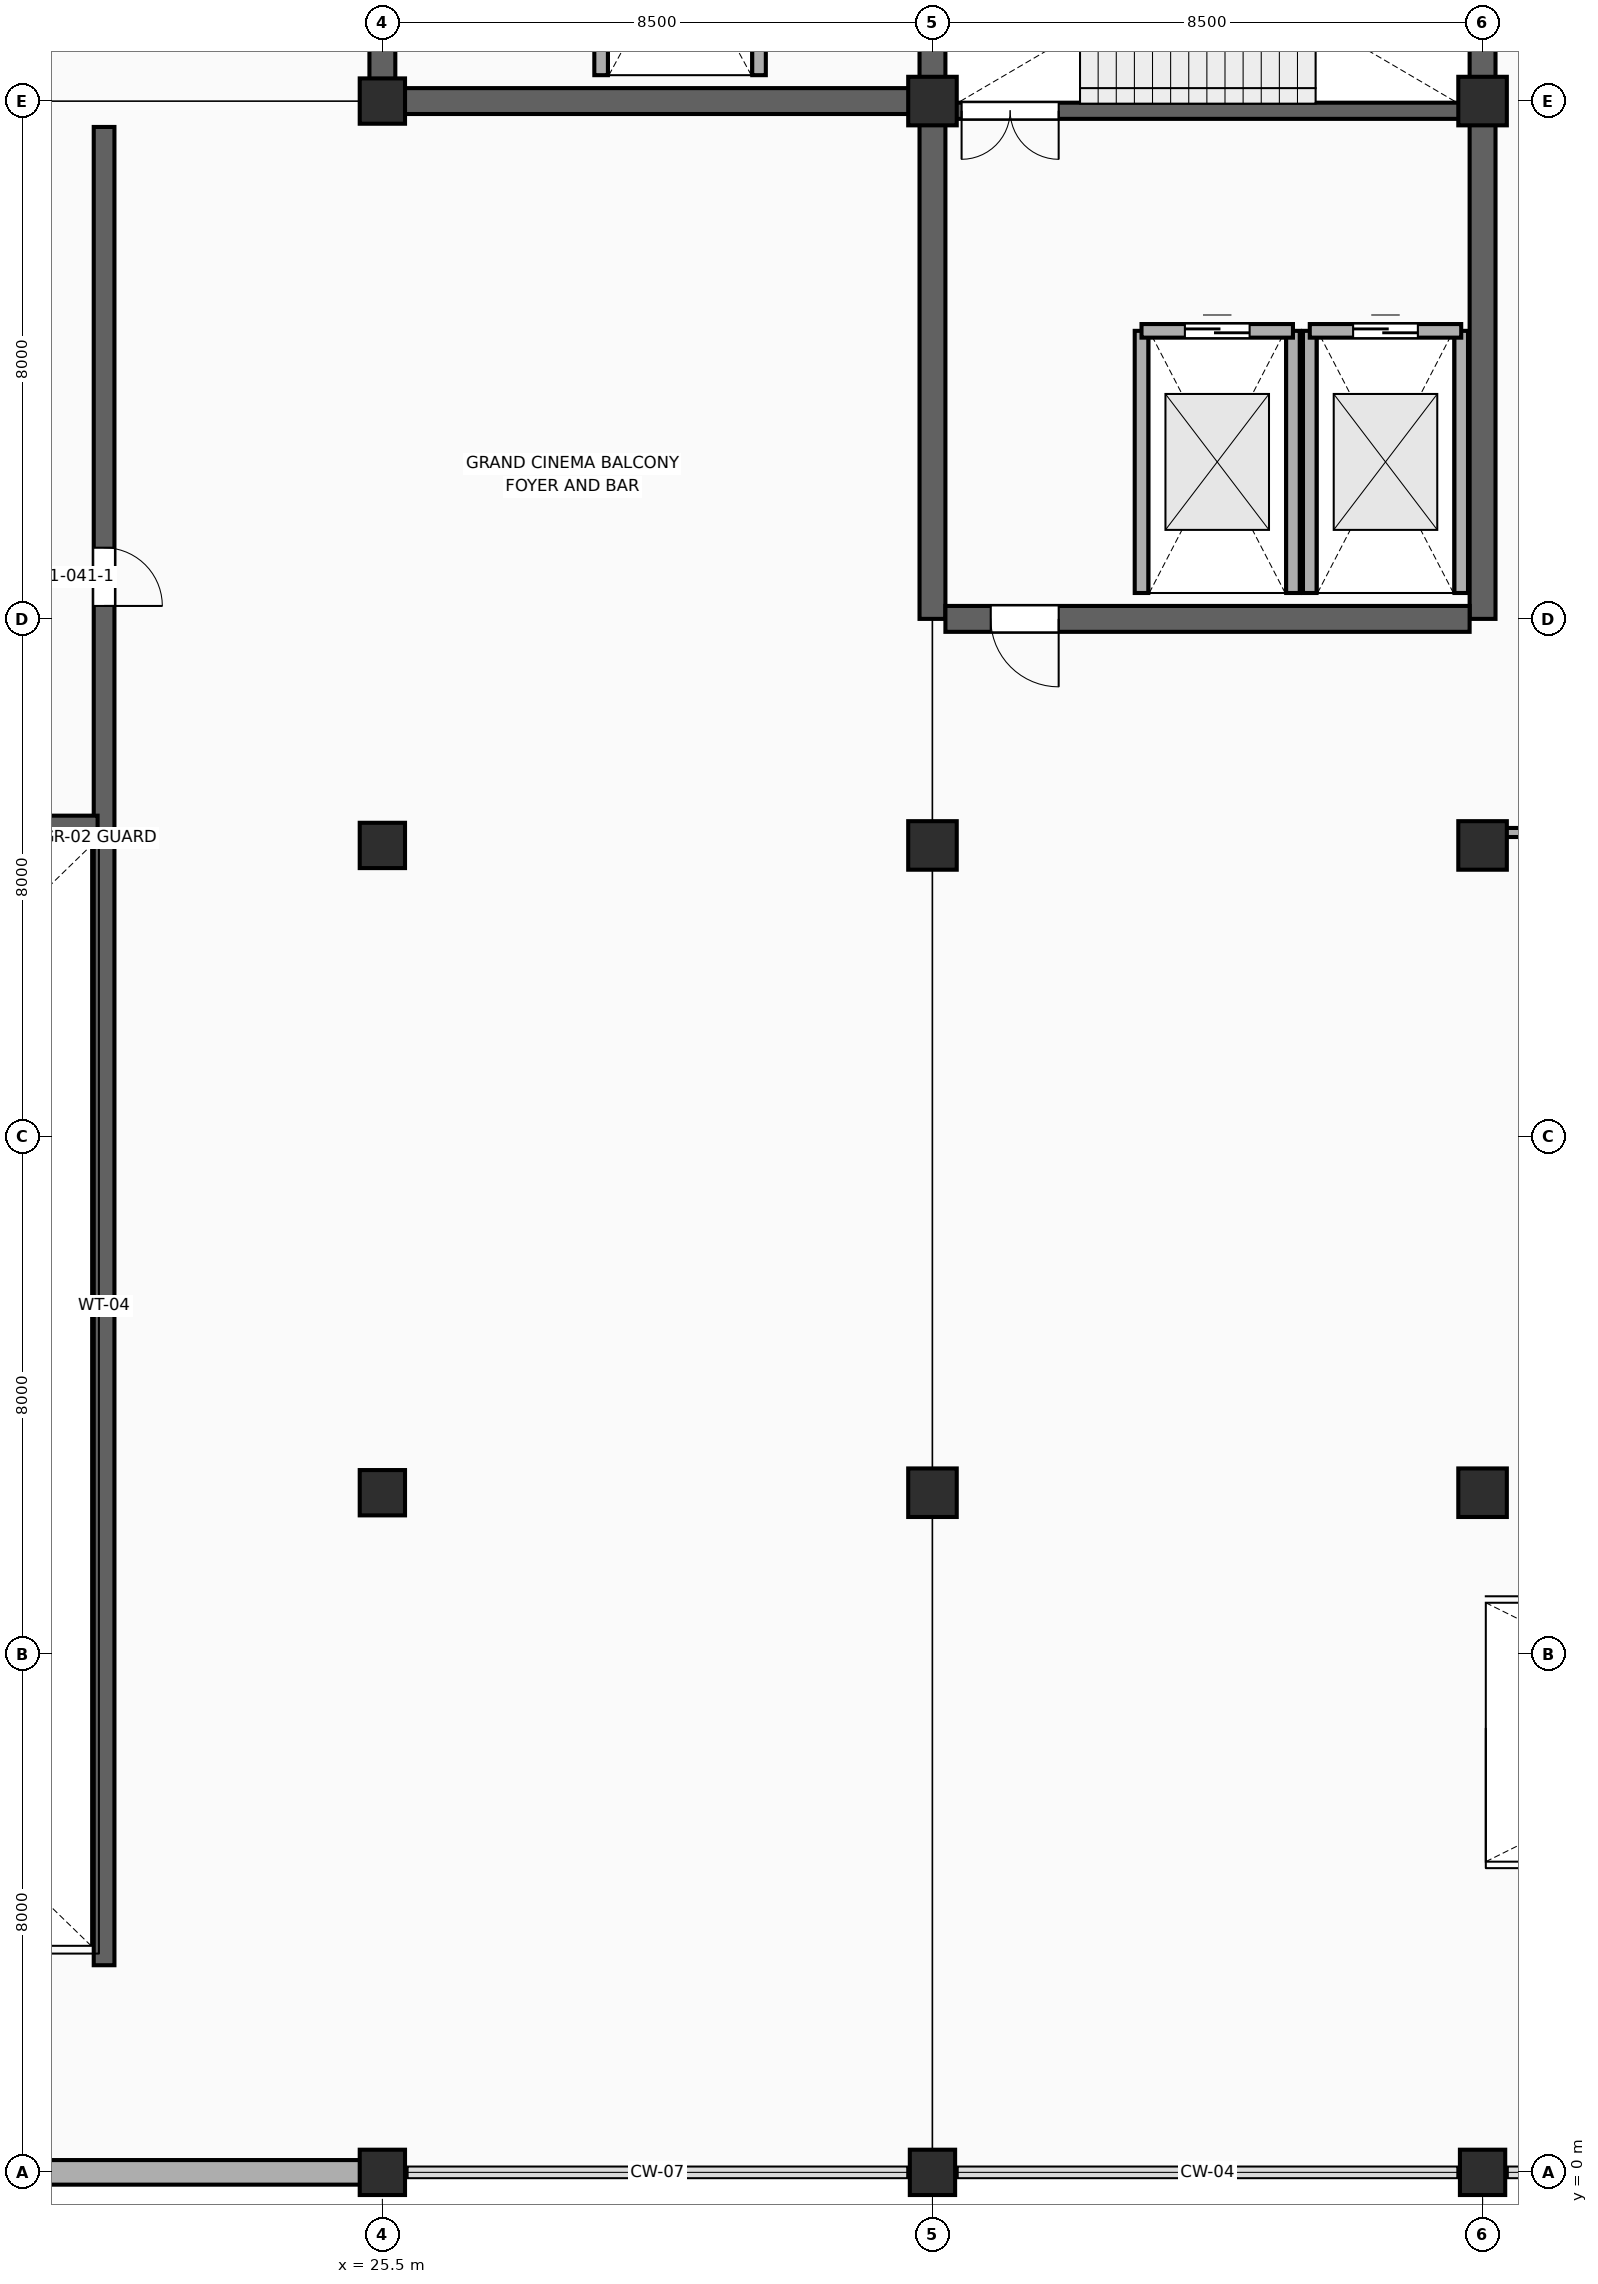
"""IFC4 building model, lengths in metres.
Left out: names, types, materials, properties, quantities, classifications, styles, units other than length and angle.
Written with IfcOpenShell. Run it as: python <this file> out.ifc"""

import sys

from ifc_helpers import new_model, si_unit, direction, frame, frame_2d, origin, origin_with_axes, origin_2d, place, context, subcontext, project, spatial, rectangle, extrude, element, fill, save


model = new_model("IFC4")
c1 = context("Model", 3, precision=1e-05, world=origin(), true_north=direction((0.0, 1.0)))
c2 = subcontext(c1, "Body", "Model", "MODEL_VIEW")
j1 = project(units=[si_unit("LENGTHUNIT", "METRE"), si_unit("PLANEANGLEUNIT", "RADIAN")], contexts=[c1])
p1 = place(None, origin())
s1 = spatial("IfcSite", under=j1, at=p1, CompositionType="ELEMENT")
p2 = place(p1, origin())
s2 = spatial("IfcBuilding", under=s1, at=p2, CompositionType="ELEMENT")
p3 = place(p2, frame((0.0, 0.0, 5.4)))
s3 = spatial("IfcBuildingStorey", under=s2, at=p3, CompositionType="ELEMENT", Elevation=5.4)
p4 = place(p3, frame((25.5, 32.0, 0.0), z_axis=(0.0, 0.0, 1.0), x_axis=(0.0, 1.0, 0.0)))
e1 = element("IfcWall", 1, at=p4, inside=s3, PredefinedType="SHEAR", context=c2, shape_type="SweptSolid", body=[
    extrude(rectangle(XDim=12.8, YDim=0.4, at=frame_2d((6.4, 0.0))), origin(), (0.0, 0.0, 1.0), 4.64),
])
p5 = place(p4, frame((1.25, 0.0, 0.0)))
e2 = element("IfcOpeningElement", 2, at=p5, cuts=e1, PredefinedType="OPENING", context=c2, shape_type="SweptSolid", body=[
    extrude(rectangle(XDim=1.05, YDim=2.15, at=frame_2d((0.525, 1.075))), frame((0.0, 0.212, 0.0), z_axis=(0.0, -1.0, 0.0), x_axis=(1.0, 0.0, 0.0)), (0.0, 0.0, 1.0), 0.424),
])
p6 = place(p3, frame((34.0, 32.0, 0.0), z_axis=(0.0, 0.0, 1.0), x_axis=(0.0, 1.0, 0.0)))
e3 = element("IfcWall", 3, at=p6, inside=s3, PredefinedType="SHEAR", context=c2, shape_type="SweptSolid", body=[
    extrude(rectangle(XDim=12.8, YDim=0.4, at=frame_2d((6.4, 0.0))), origin(), (0.0, 0.0, 1.0), 4.64),
])
p7 = place(p3, frame((25.7, 32.0, 0.0), z_axis=(0.0, 0.0, 1.0), x_axis=(1.0, 0.0, 0.0)))
e4 = element("IfcWall", 4, at=p7, inside=s3, PredefinedType="SHEAR", context=c2, shape_type="SweptSolid", body=[
    extrude(rectangle(XDim=8.1, YDim=0.4, at=frame_2d((4.05, 0.0))), origin(), (0.0, 0.0, 1.0), 4.64),
])
for number, where, z_axis, x_axis in (
    (5, (28.88, 32.4, 0.0), (0.0, 0.0, 1.0), (0.0, 1.0, 0.0)),
    (6, (31.32, 32.4, 0.0), (0.0, 0.0, 1.0), (0.0, 1.0, 0.0)),
):
    element("IfcWall", number, at=place(p3, frame(where, z_axis=z_axis, x_axis=x_axis)), inside=s3, PredefinedType="PARTITIONING", context=c2, shape_type="SweptSolid", body=[
        extrude(rectangle(XDim=4.05, YDim=0.21, at=frame_2d((2.025, 0.0))), origin(), (0.0, 0.0, 1.0), 4.64),
    ])
p8 = place(p3, frame((34.0, 24.0, 0.0), z_axis=(0.0, 0.0, 1.0), x_axis=(0.0, 1.0, 0.0)))
e7 = element("IfcWall", 7, at=p8, inside=s3, PredefinedType="SHEAR", context=c2, shape_type="SweptSolid", body=[
    extrude(rectangle(XDim=7.8, YDim=0.4, at=frame_2d((3.9, 0.0))), origin(), (0.0, 0.0, 1.0), 4.64),
])
p9 = place(p3, frame((42.5, 24.0, 0.0), z_axis=(0.0, 0.0, 1.0), x_axis=(0.0, 1.0, 0.0)))
e8 = element("IfcWall", 8, at=p9, inside=s3, PredefinedType="SHEAR", context=c2, shape_type="SweptSolid", body=[
    extrude(rectangle(XDim=12.8, YDim=0.4, at=frame_2d((6.4, 0.0))), origin(), (0.0, 0.0, 1.0), 4.64),
])
p10 = place(p3, frame((34.2, 24.0, 0.0), z_axis=(0.0, 0.0, 1.0), x_axis=(1.0, 0.0, 0.0)))
e9 = element("IfcWall", 9, at=p10, inside=s3, PredefinedType="SHEAR", context=c2, shape_type="SweptSolid", body=[
    extrude(rectangle(XDim=8.1, YDim=0.4, at=frame_2d((4.05, 0.0))), origin(), (0.0, 0.0, 1.0), 4.64),
])
p11 = place(p10, frame((0.7, 0.0, 0.0)))
e10 = element("IfcOpeningElement", 10, at=p11, cuts=e9, PredefinedType="OPENING", context=c2, shape_type="SweptSolid", body=[
    extrude(rectangle(XDim=1.05, YDim=2.15, at=frame_2d((0.525, 1.075))), frame((0.0, 0.212, 0.0), z_axis=(0.0, -1.0, 0.0), x_axis=(1.0, 0.0, 0.0)), (0.0, 0.0, 1.0), 0.424),
])
p12 = place(p3, frame((34.25, 31.85, 0.0), z_axis=(0.0, 0.0, 1.0), x_axis=(1.0, 0.0, 0.0)))
e11 = element("IfcWall", 11, at=p12, inside=s3, PredefinedType="STANDARD", context=c2, shape_type="SweptSolid", body=[
    extrude(rectangle(XDim=8.0, YDim=0.25, at=frame_2d((4.0, 0.0))), origin(), (0.0, 0.0, 1.0), 4.64),
])
p13 = place(p12, frame((0.2, 0.0, 0.0)))
e12 = element("IfcOpeningElement", 12, at=p13, cuts=e11, PredefinedType="OPENING", context=c2, shape_type="SweptSolid", body=[
    extrude(rectangle(XDim=1.5, YDim=2.2, at=frame_2d((0.75, 1.1))), frame((0.0, 0.137, 0.0), z_axis=(0.0, -1.0, 0.0), x_axis=(1.0, 0.0, 0.0)), (0.0, 0.0, 1.0), 0.274),
])
for number, where, z_axis, x_axis in (
    (13, (37.23, 24.4, 0.0), (0.0, 0.0, 1.0), (0.0, 1.0, 0.0)),
    (14, (39.57, 24.4, 0.0), (0.0, 0.0, 1.0), (0.0, 1.0, 0.0)),
):
    element("IfcWall", number, at=place(p3, frame(where, z_axis=z_axis, x_axis=x_axis)), inside=s3, PredefinedType="PARTITIONING", context=c2, shape_type="SweptSolid", body=[
        extrude(rectangle(XDim=4.05, YDim=0.21, at=frame_2d((2.025, 0.0))), origin(), (0.0, 0.0, 1.0), 4.64),
    ])
p14 = place(p3, frame((37.23, 28.45, 0.0), z_axis=(0.0, 0.0, 1.0), x_axis=(1.0, 0.0, 0.0)))
e15 = element("IfcWall", 15, at=p14, inside=s3, PredefinedType="PARTITIONING", context=c2, shape_type="SweptSolid", body=[
    extrude(rectangle(XDim=2.34, YDim=0.21, at=frame_2d((1.17, 0.0))), origin(), (0.0, 0.0, 1.0), 4.64),
])
p15 = place(p14, frame((0.67, 0.0, 0.0)))
e16 = element("IfcOpeningElement", 16, at=p15, cuts=e15, PredefinedType="OPENING", context=c2, shape_type="SweptSolid", body=[
    extrude(rectangle(XDim=1.0, YDim=2.2, at=frame_2d((0.5, 1.1))), frame((0.0, 0.117, 0.0), z_axis=(0.0, -1.0, 0.0), x_axis=(1.0, 0.0, 0.0)), (0.0, 0.0, 1.0), 0.234),
])
for number, where, z_axis, x_axis in (
    (17, (39.83, 24.4, 0.0), (0.0, 0.0, 1.0), (0.0, 1.0, 0.0)),
    (18, (42.17, 24.4, 0.0), (0.0, 0.0, 1.0), (0.0, 1.0, 0.0)),
):
    element("IfcWall", number, at=place(p3, frame(where, z_axis=z_axis, x_axis=x_axis)), inside=s3, PredefinedType="PARTITIONING", context=c2, shape_type="SweptSolid", body=[
        extrude(rectangle(XDim=4.05, YDim=0.21, at=frame_2d((2.025, 0.0))), origin(), (0.0, 0.0, 1.0), 4.64),
    ])
p16 = place(p3, frame((39.83, 28.45, 0.0), z_axis=(0.0, 0.0, 1.0), x_axis=(1.0, 0.0, 0.0)))
e19 = element("IfcWall", 19, at=p16, inside=s3, PredefinedType="PARTITIONING", context=c2, shape_type="SweptSolid", body=[
    extrude(rectangle(XDim=2.34, YDim=0.21, at=frame_2d((1.17, 0.0))), origin(), (0.0, 0.0, 1.0), 4.64),
])
p17 = place(p16, frame((0.67, 0.0, 0.0)))
e20 = element("IfcOpeningElement", 20, at=p17, cuts=e19, PredefinedType="OPENING", context=c2, shape_type="SweptSolid", body=[
    extrude(rectangle(XDim=1.0, YDim=2.2, at=frame_2d((0.5, 1.1))), frame((0.0, 0.117, 0.0), z_axis=(0.0, -1.0, 0.0), x_axis=(1.0, 0.0, 0.0)), (0.0, 0.0, 1.0), 0.234),
])
for number, where, z_axis, x_axis in (
    (21, (25.5, 0.0, 0.0), (0.0, 0.0, 1.0), (1.0, 0.0, 0.0)),
    (22, (25.5, 10.5, 0.0), (0.0, 0.0, 1.0), (1.0, 0.0, 0.0)),
    (23, (25.5, 20.5, 0.0), (0.0, 0.0, 1.0), (1.0, 0.0, 0.0)),
    (24, (25.5, 32.0, 0.0), (0.0, 0.0, 1.0), (1.0, 0.0, 0.0)),
):
    element("IfcColumn", number, at=place(p3, frame(where, z_axis=z_axis, x_axis=x_axis)), inside=s3, PredefinedType="COLUMN", context=c2, shape_type="SweptSolid", body=[
        extrude(rectangle(XDim=0.7, YDim=0.7, at=origin_2d()), origin(), (0.0, 0.0, 1.0), 4.54),
    ])
p18 = place(p3, frame((34.0, 0.0, 0.0), z_axis=(0.0, 0.0, 1.0), x_axis=(1.0, 0.0, 0.0)))
e25 = element("IfcColumn", 25, at=p18, inside=s3, PredefinedType="COLUMN", context=c2, shape_type="SweptSolid", body=[
    extrude(rectangle(XDim=0.7, YDim=0.7, at=origin_2d()), origin(), (0.0, 0.0, 1.0), 4.52),
])
for number, where, z_axis, x_axis in (
    (26, (34.0, 10.5, 0.0), (0.0, 0.0, 1.0), (1.0, 0.0, 0.0)),
    (27, (34.0, 20.5, 0.0), (0.0, 0.0, 1.0), (1.0, 0.0, 0.0)),
    (28, (34.0, 32.0, 0.0), (0.0, 0.0, 1.0), (1.0, 0.0, 0.0)),
):
    element("IfcColumn", number, at=place(p3, frame(where, z_axis=z_axis, x_axis=x_axis)), inside=s3, PredefinedType="COLUMN", context=c2, shape_type="SweptSolid", body=[
        extrude(rectangle(XDim=0.75, YDim=0.75, at=origin_2d()), origin(), (0.0, 0.0, 1.0), 4.52),
    ])
p19 = place(p3, frame((42.5, 0.0, 0.0), z_axis=(0.0, 0.0, 1.0), x_axis=(1.0, 0.0, 0.0)))
e29 = element("IfcColumn", 29, at=p19, inside=s3, PredefinedType="COLUMN", context=c2, shape_type="SweptSolid", body=[
    extrude(rectangle(XDim=0.7, YDim=0.7, at=origin_2d()), origin(), (0.0, 0.0, 1.0), 4.52),
])
for number, where, z_axis, x_axis in (
    (30, (42.5, 10.5, 0.0), (0.0, 0.0, 1.0), (1.0, 0.0, 0.0)),
    (31, (42.5, 20.5, 0.0), (0.0, 0.0, 1.0), (1.0, 0.0, 0.0)),
    (32, (42.5, 32.0, 0.0), (0.0, 0.0, 1.0), (1.0, 0.0, 0.0)),
):
    element("IfcColumn", number, at=place(p3, frame(where, z_axis=z_axis, x_axis=x_axis)), inside=s3, PredefinedType="COLUMN", context=c2, shape_type="SweptSolid", body=[
        extrude(rectangle(XDim=0.75, YDim=0.75, at=origin_2d()), origin(), (0.0, 0.0, 1.0), 4.52),
    ])
p20 = place(p3, origin_with_axes())
e33 = element("IfcWall", 33, at=p20, inside=s3, PredefinedType="STANDARD", context=c2, shape_type="SweptSolid", body=[
    extrude(rectangle(XDim=25.5, YDim=0.38, at=frame_2d((12.75, 0.0))), origin(), (0.0, 0.0, 1.0), 4.128),
])
p21 = place(p20, frame((2.95, 0.0, 2.568)))
e34 = element("IfcOpeningElement", 34, at=p21, cuts=e33, PredefinedType="OPENING", context=c2, shape_type="SweptSolid", body=[
    extrude(rectangle(XDim=2.6, YDim=1.4, at=frame_2d((1.3, 0.7))), frame((0.0, 0.202, 0.0), z_axis=(0.0, -1.0, 0.0), x_axis=(1.0, 0.0, 0.0)), (0.0, 0.0, 1.0), 0.404),
])
p22 = place(p20, frame((11.45, 0.0, 2.568)))
e35 = element("IfcOpeningElement", 35, at=p22, cuts=e33, PredefinedType="OPENING", context=c2, shape_type="SweptSolid", body=[
    extrude(rectangle(XDim=2.6, YDim=1.4, at=frame_2d((1.3, 0.7))), frame((0.0, 0.202, 0.0), z_axis=(0.0, -1.0, 0.0), x_axis=(1.0, 0.0, 0.0)), (0.0, 0.0, 1.0), 0.404),
])
p23 = place(p3, frame((21.2, 3.2, 0.0), z_axis=(0.0, 0.0, 1.0), x_axis=(0.0, 1.0, 0.0)))
e36 = element("IfcWall", 36, at=p23, inside=s3, PredefinedType="SHEAR", context=c2, shape_type="SweptSolid", body=[
    extrude(rectangle(XDim=28.4, YDim=0.32, at=frame_2d((14.2, 0.0))), origin(), (0.0, 0.0, 1.0), 4.5),
])
p24 = place(p23, frame((21.0, 0.0, 0.0)))
e37 = element("IfcOpeningElement", 37, at=p24, cuts=e36, PredefinedType="OPENING", context=c2, shape_type="SweptSolid", body=[
    extrude(rectangle(XDim=0.9, YDim=2.1, at=frame_2d((0.45, 1.05))), frame((0.0, 0.172, 0.0), z_axis=(0.0, -1.0, 0.0), x_axis=(1.0, 0.0, 0.0)), (0.0, 0.0, 1.0), 0.344),
])
p25 = place(p3, frame((3.2, 20.8, 0.0), z_axis=(0.0, 0.0, 1.0), x_axis=(1.0, 0.0, 0.0)))
e38 = element("IfcWall", 38, at=p25, inside=s3, PredefinedType="SHEAR", context=c2, shape_type="SweptSolid", body=[
    extrude(rectangle(XDim=17.9, YDim=0.32, at=frame_2d((8.95, 0.0))), origin(), (0.0, 0.0, 1.0), 4.5),
])
p26 = place(p3, frame((42.8, 20.7, 0.0), z_axis=(0.0, 0.0, 1.0), x_axis=(1.0, 0.0, 0.0)))
e39 = element("IfcWall", 39, at=p26, inside=s3, PredefinedType="PARTITIONING", context=c2, shape_type="SweptSolid", body=[
    extrude(rectangle(XDim=24.9, YDim=0.14, at=frame_2d((12.45, 0.0))), origin(), (0.0, 0.0, 1.0), 3.66),
])
p27 = place(p26, frame((21.0, 0.0, 0.0)))
e40 = element("IfcOpeningElement", 40, at=p27, cuts=e39, PredefinedType="OPENING", context=c2, shape_type="SweptSolid", body=[
    extrude(rectangle(XDim=1.7, YDim=2.35, at=frame_2d((0.85, 1.175))), frame((0.0, 0.082, 0.0), z_axis=(0.0, -1.0, 0.0), x_axis=(1.0, 0.0, 0.0)), (0.0, 0.0, 1.0), 0.164),
])
p28 = place(p26, frame((4.0, 0.0, 1.0)))
e41 = element("IfcOpeningElement", 41, at=p28, cuts=e39, PredefinedType="OPENING", context=c2, shape_type="SweptSolid", body=[
    extrude(rectangle(XDim=2.8, YDim=1.6, at=frame_2d((1.4, 0.8))), frame((0.0, 0.082, 0.0), z_axis=(0.0, -1.0, 0.0), x_axis=(1.0, 0.0, 0.0)), (0.0, 0.0, 1.0), 0.164),
])
p29 = place(p13, frame((1.5, 0.0, 0.0), z_axis=(0.0, 0.0, 1.0), x_axis=(-1.0, 0.0, 0.0)))
e42 = element("IfcDoor", 42, at=p29, inside=s3, OperationType="DOUBLE_DOOR_SINGLE_SWING", PredefinedType="DOOR", context=c2, shape_type="SweptSolid", body=[
    extrude(rectangle(XDim=1.5, YDim=2.2, at=frame_2d((0.75, 1.1))), frame((0.0, 0.025, 0.0), z_axis=(0.0, -1.0, 0.0), x_axis=(1.0, 0.0, 0.0)), (0.0, 0.0, 1.0), 0.05),
])
fill(e12, e42)
p30 = place(p15, origin())
e43 = element("IfcDoor", 43, at=p30, inside=s3, OperationType="DOUBLE_DOOR_SLIDING", PredefinedType="DOOR", context=c2, shape_type="SweptSolid", body=[
    extrude(rectangle(XDim=1.0, YDim=2.2, at=frame_2d((0.5, 1.1))), frame((0.0, 0.025, 0.0), z_axis=(0.0, -1.0, 0.0), x_axis=(1.0, 0.0, 0.0)), (0.0, 0.0, 1.0), 0.05),
])
fill(e16, e43)
p31 = place(p17, origin())
e44 = element("IfcDoor", 44, at=p31, inside=s3, OperationType="DOUBLE_DOOR_SLIDING", PredefinedType="DOOR", context=c2, shape_type="SweptSolid", body=[
    extrude(rectangle(XDim=1.0, YDim=2.2, at=frame_2d((0.5, 1.1))), frame((0.0, 0.025, 0.0), z_axis=(0.0, -1.0, 0.0), x_axis=(1.0, 0.0, 0.0)), (0.0, 0.0, 1.0), 0.05),
])
fill(e20, e44)
p32 = place(p11, frame((1.05, 0.0, 0.0), z_axis=(0.0, 0.0, 1.0), x_axis=(-1.0, 0.0, 0.0)))
e45 = element("IfcDoor", 45, at=p32, inside=s3, OperationType="SINGLE_SWING_RIGHT", PredefinedType="DOOR", context=c2, shape_type="SweptSolid", body=[
    extrude(rectangle(XDim=1.05, YDim=2.15, at=frame_2d((0.525, 1.075))), frame((0.0, 0.025, 0.0), z_axis=(0.0, -1.0, 0.0), x_axis=(1.0, 0.0, 0.0)), (0.0, 0.0, 1.0), 0.05),
])
fill(e10, e45)
p33 = place(p24, frame((0.9, 0.0, 0.0), z_axis=(0.0, 0.0, 1.0), x_axis=(-1.0, 0.0, 0.0)))
e46 = element("IfcDoor", 46, at=p33, inside=s3, OperationType="SINGLE_SWING_LEFT", PredefinedType="DOOR", context=c2, shape_type="SweptSolid", body=[
    extrude(rectangle(XDim=0.9, YDim=2.1, at=frame_2d((0.45, 1.05))), frame((0.0, 0.025, 0.0), z_axis=(0.0, -1.0, 0.0), x_axis=(1.0, 0.0, 0.0)), (0.0, 0.0, 1.0), 0.05),
])
fill(e37, e46)
save(model, sys.argv[1])
